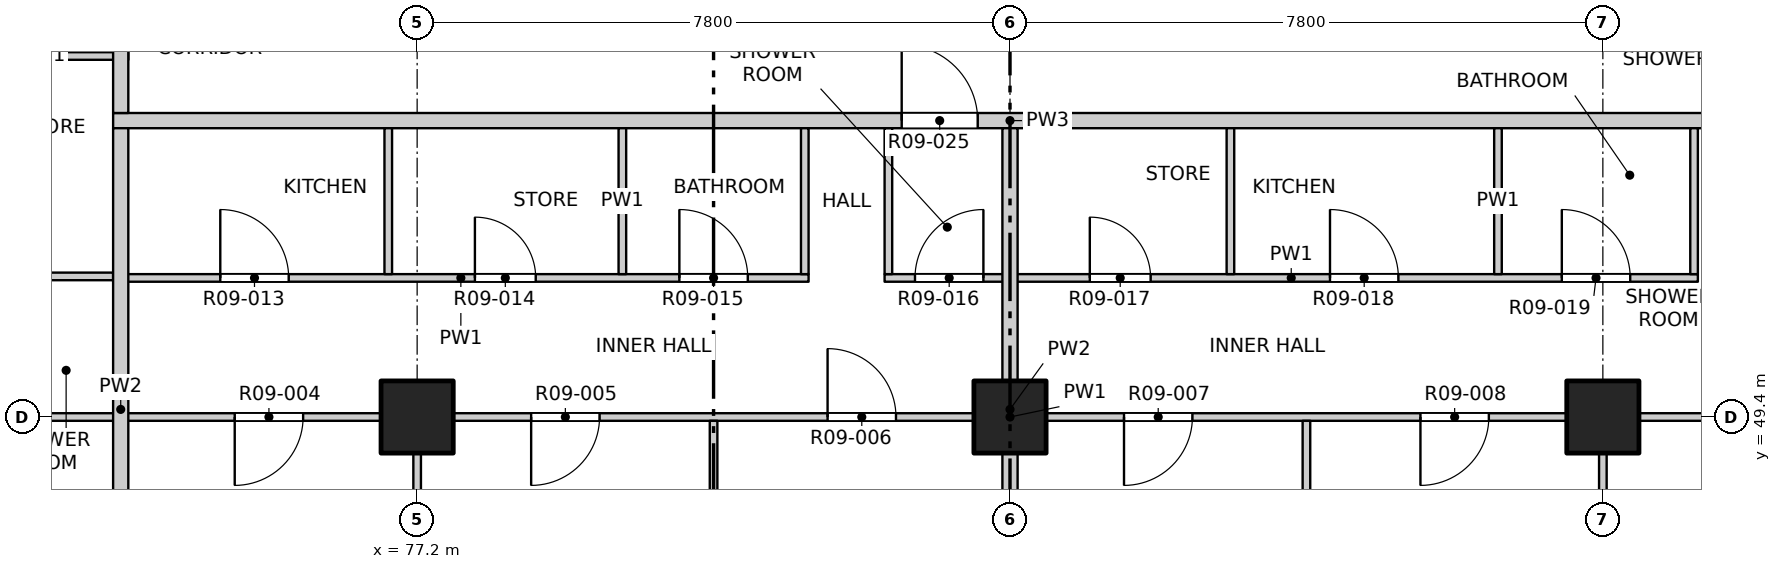
"""IFC4 building model, lengths in metres.
Left out: names, types, materials, properties, quantities, classifications, styles, units other than length and angle.
Written with IfcOpenShell. Run it as: python <this file> out.ifc"""

import sys

from ifc_helpers import new_model, si_unit, direction, frame, frame_2d, origin, origin_2d, place, context, subcontext, project, spatial, rectangle, extrude, element, fill, save


model = new_model("IFC4")
c1 = context("Model", 3, precision=1e-05, world=origin(), true_north=direction((0.0, 1.0)))
c2 = subcontext(c1, "Body", "Model", "MODEL_VIEW")
j1 = project(units=[si_unit("LENGTHUNIT", "METRE"), si_unit("PLANEANGLEUNIT", "RADIAN")], contexts=[c1])
p1 = place(None, origin())
s1 = spatial("IfcSite", under=j1, at=p1, CompositionType="ELEMENT")
p2 = place(p1, origin())
s2 = spatial("IfcBuilding", under=s1, at=p2, CompositionType="ELEMENT")
p3 = place(p2, frame((0.0, 0.0, 113.5)))
s3 = spatial("IfcBuildingStorey", under=s2, at=p3, CompositionType="ELEMENT", Elevation=113.5)
for number, where, z_axis, x_axis in (
    (1, (77.2, 49.4, -0.25), (0.0, 0.0, 1.0), (1.0, 0.0, 0.0)),
    (2, (85.0, 49.4, -0.25), (0.0, 0.0, 1.0), (1.0, 0.0, 0.0)),
    (3, (92.8, 49.4, -0.25), (0.0, 0.0, 1.0), (1.0, 0.0, 0.0)),
):
    element("IfcColumn", number, at=place(p3, frame(where, z_axis=z_axis, x_axis=x_axis)), inside=s3, PredefinedType="COLUMN", context=c2, shape_type="SweptSolid", body=[
        extrude(rectangle(XDim=0.95, YDim=0.95, at=origin_2d()), origin(), (0.0, 0.0, 1.0), 3.35),
    ])
p4 = place(p3, frame((65.8, 49.4, 0.0), z_axis=(0.0, 0.0, 1.0), x_axis=(1.0, 0.0, 0.0)))
e4 = element("IfcWall", 4, at=p4, inside=s3, PredefinedType="PARTITIONING", context=c2, shape_type="SweptSolid", body=[
    extrude(rectangle(XDim=38.4, YDim=0.1, at=frame_2d((19.2, 0.0))), origin(), (0.0, 0.0, 1.0), 3.1),
])
p5 = place(p4, frame((4.19, 0.0, 0.0)))
e5 = element("IfcOpeningElement", 5, at=p5, cuts=e4, PredefinedType="OPENING", context=c2, shape_type="SweptSolid", body=[
    extrude(rectangle(XDim=0.9, YDim=2.1, at=frame_2d((0.45, 1.05))), frame((0.0, 0.06, 0.0), z_axis=(0.0, -1.0, 0.0), x_axis=(1.0, 0.0, 0.0)), (0.0, 0.0, 1.0), 0.12),
])
p6 = place(p4, frame((9.0, 0.0, 0.0)))
e6 = element("IfcOpeningElement", 6, at=p6, cuts=e4, PredefinedType="OPENING", context=c2, shape_type="SweptSolid", body=[
    extrude(rectangle(XDim=0.9, YDim=2.1, at=frame_2d((0.45, 1.05))), frame((0.0, 0.06, 0.0), z_axis=(0.0, -1.0, 0.0), x_axis=(1.0, 0.0, 0.0)), (0.0, 0.0, 1.0), 0.12),
])
p7 = place(p4, frame((12.9, 0.0, 0.0)))
e7 = element("IfcOpeningElement", 7, at=p7, cuts=e4, PredefinedType="OPENING", context=c2, shape_type="SweptSolid", body=[
    extrude(rectangle(XDim=0.9, YDim=2.1, at=frame_2d((0.45, 1.05))), frame((0.0, 0.06, 0.0), z_axis=(0.0, -1.0, 0.0), x_axis=(1.0, 0.0, 0.0)), (0.0, 0.0, 1.0), 0.12),
])
p8 = place(p4, frame((16.8, 0.0, 0.0)))
e8 = element("IfcOpeningElement", 8, at=p8, cuts=e4, PredefinedType="OPENING", context=c2, shape_type="SweptSolid", body=[
    extrude(rectangle(XDim=0.9, YDim=2.1, at=frame_2d((0.45, 1.05))), frame((0.0, 0.06, 0.0), z_axis=(0.0, -1.0, 0.0), x_axis=(1.0, 0.0, 0.0)), (0.0, 0.0, 1.0), 0.12),
])
p9 = place(p4, frame((20.7, 0.0, 0.0)))
e9 = element("IfcOpeningElement", 9, at=p9, cuts=e4, PredefinedType="OPENING", context=c2, shape_type="SweptSolid", body=[
    extrude(rectangle(XDim=0.9, YDim=2.1, at=frame_2d((0.45, 1.05))), frame((0.0, 0.06, 0.0), z_axis=(0.0, -1.0, 0.0), x_axis=(1.0, 0.0, 0.0)), (0.0, 0.0, 1.0), 0.12),
])
p10 = place(p4, frame((24.6, 0.0, 0.0)))
e10 = element("IfcOpeningElement", 10, at=p10, cuts=e4, PredefinedType="OPENING", context=c2, shape_type="SweptSolid", body=[
    extrude(rectangle(XDim=0.9, YDim=2.1, at=frame_2d((0.45, 1.05))), frame((0.0, 0.06, 0.0), z_axis=(0.0, -1.0, 0.0), x_axis=(1.0, 0.0, 0.0)), (0.0, 0.0, 1.0), 0.12),
])
p11 = place(p4, frame((28.5, 0.0, 0.0)))
e11 = element("IfcOpeningElement", 11, at=p11, cuts=e4, PredefinedType="OPENING", context=c2, shape_type="SweptSolid", body=[
    extrude(rectangle(XDim=0.9, YDim=2.1, at=frame_2d((0.45, 1.05))), frame((0.0, 0.06, 0.0), z_axis=(0.0, -1.0, 0.0), x_axis=(1.0, 0.0, 0.0)), (0.0, 0.0, 1.0), 0.12),
])
p12 = place(p4, frame((33.31, 0.0, 0.0)))
e12 = element("IfcOpeningElement", 12, at=p12, cuts=e4, PredefinedType="OPENING", context=c2, shape_type="SweptSolid", body=[
    extrude(rectangle(XDim=0.9, YDim=2.1, at=frame_2d((0.45, 1.05))), frame((0.0, 0.06, 0.0), z_axis=(0.0, -1.0, 0.0), x_axis=(1.0, 0.0, 0.0)), (0.0, 0.0, 1.0), 0.12),
])
p13 = place(p3, frame((73.2, 51.23, 0.0), z_axis=(0.0, 0.0, 1.0), x_axis=(1.0, 0.0, 0.0)))
e13 = element("IfcWall", 13, at=p13, inside=s3, PredefinedType="PARTITIONING", context=c2, shape_type="SweptSolid", body=[
    extrude(rectangle(XDim=9.15, YDim=0.1, at=frame_2d((4.575, 0.0))), origin(), (0.0, 0.0, 1.0), 3.1),
])
p14 = place(p13, frame((1.41, 0.0, 0.0)))
e14 = element("IfcOpeningElement", 14, at=p14, cuts=e13, PredefinedType="OPENING", context=c2, shape_type="SweptSolid", body=[
    extrude(rectangle(XDim=0.9, YDim=2.1, at=frame_2d((0.45, 1.05))), frame((0.0, 0.06, 0.0), z_axis=(0.0, -1.0, 0.0), x_axis=(1.0, 0.0, 0.0)), (0.0, 0.0, 1.0), 0.12),
])
p15 = place(p13, frame((4.76, 0.0, 0.0)))
e15 = element("IfcOpeningElement", 15, at=p15, cuts=e13, PredefinedType="OPENING", context=c2, shape_type="SweptSolid", body=[
    extrude(rectangle(XDim=0.8, YDim=2.1, at=frame_2d((0.4, 1.05))), frame((0.0, 0.06, 0.0), z_axis=(0.0, -1.0, 0.0), x_axis=(1.0, 0.0, 0.0)), (0.0, 0.0, 1.0), 0.12),
])
p16 = place(p13, frame((7.45, 0.0, 0.0)))
e16 = element("IfcOpeningElement", 16, at=p16, cuts=e13, PredefinedType="OPENING", context=c2, shape_type="SweptSolid", body=[
    extrude(rectangle(XDim=0.9, YDim=2.1, at=frame_2d((0.45, 1.05))), frame((0.0, 0.06, 0.0), z_axis=(0.0, -1.0, 0.0), x_axis=(1.0, 0.0, 0.0)), (0.0, 0.0, 1.0), 0.12),
])
p17 = place(p3, frame((83.35, 51.23, 0.0), z_axis=(0.0, 0.0, 1.0), x_axis=(1.0, 0.0, 0.0)))
e17 = element("IfcWall", 17, at=p17, inside=s3, PredefinedType="PARTITIONING", context=c2, shape_type="SweptSolid", body=[
    extrude(rectangle(XDim=10.7, YDim=0.1, at=frame_2d((5.35, 0.0))), origin(), (0.0, 0.0, 1.0), 3.1),
])
p18 = place(p17, frame((0.4, 0.0, 0.0)))
e18 = element("IfcOpeningElement", 18, at=p18, cuts=e17, PredefinedType="OPENING", context=c2, shape_type="SweptSolid", body=[
    extrude(rectangle(XDim=0.9, YDim=2.1, at=frame_2d((0.45, 1.05))), frame((0.0, 0.06, 0.0), z_axis=(0.0, -1.0, 0.0), x_axis=(1.0, 0.0, 0.0)), (0.0, 0.0, 1.0), 0.12),
])
p19 = place(p17, frame((2.7, 0.0, 0.0)))
e19 = element("IfcOpeningElement", 19, at=p19, cuts=e17, PredefinedType="OPENING", context=c2, shape_type="SweptSolid", body=[
    extrude(rectangle(XDim=0.8, YDim=2.1, at=frame_2d((0.4, 1.05))), frame((0.0, 0.06, 0.0), z_axis=(0.0, -1.0, 0.0), x_axis=(1.0, 0.0, 0.0)), (0.0, 0.0, 1.0), 0.12),
])
p20 = place(p17, frame((5.86, 0.0, 0.0)))
e20 = element("IfcOpeningElement", 20, at=p20, cuts=e17, PredefinedType="OPENING", context=c2, shape_type="SweptSolid", body=[
    extrude(rectangle(XDim=0.9, YDim=2.1, at=frame_2d((0.45, 1.05))), frame((0.0, 0.06, 0.0), z_axis=(0.0, -1.0, 0.0), x_axis=(1.0, 0.0, 0.0)), (0.0, 0.0, 1.0), 0.12),
])
p21 = place(p17, frame((8.91, 0.0, 0.0)))
e21 = element("IfcOpeningElement", 21, at=p21, cuts=e17, PredefinedType="OPENING", context=c2, shape_type="SweptSolid", body=[
    extrude(rectangle(XDim=0.9, YDim=2.1, at=frame_2d((0.45, 1.05))), frame((0.0, 0.06, 0.0), z_axis=(0.0, -1.0, 0.0), x_axis=(1.0, 0.0, 0.0)), (0.0, 0.0, 1.0), 0.12),
])
p22 = place(p3, frame((71.18, 51.25, 0.0), z_axis=(0.0, 0.0, 1.0), x_axis=(1.0, 0.0, 0.0)))
e22 = element("IfcWall", 22, at=p22, inside=s3, PredefinedType="PARTITIONING", context=c2, shape_type="SweptSolid", body=[
    extrude(rectangle(XDim=2.02, YDim=0.1, at=frame_2d((1.01, 0.0))), origin(), (0.0, 0.0, 1.0), 3.1),
])
p23 = place(p3, frame((73.2, 53.3, 0.0), z_axis=(0.0, 0.0, 1.0), x_axis=(1.0, 0.0, 0.0)))
e23 = element("IfcWall", 23, at=p23, inside=s3, PredefinedType="PARTITIONING", context=c2, shape_type="SweptSolid", body=[
    extrude(rectangle(XDim=23.6, YDim=0.2, at=frame_2d((11.8, 0.0))), origin(), (0.0, 0.0, 1.0), 3.1),
])
p24 = place(p23, frame((10.375, 0.0, 0.0)))
e24 = element("IfcOpeningElement", 24, at=p24, cuts=e23, PredefinedType="OPENING", context=c2, shape_type="SweptSolid", body=[
    extrude(rectangle(XDim=1.0, YDim=2.1, at=frame_2d((0.5, 1.05))), frame((0.0, 0.11, 0.0), z_axis=(0.0, -1.0, 0.0), x_axis=(1.0, 0.0, 0.0)), (0.0, 0.0, 1.0), 0.22),
])
p25 = place(p23, frame((22.075, 0.0, 0.0)))
e25 = element("IfcOpeningElement", 25, at=p25, cuts=e23, PredefinedType="OPENING", context=c2, shape_type="SweptSolid", body=[
    extrude(rectangle(XDim=1.0, YDim=2.1, at=frame_2d((0.5, 1.05))), frame((0.0, 0.11, 0.0), z_axis=(0.0, -1.0, 0.0), x_axis=(1.0, 0.0, 0.0)), (0.0, 0.0, 1.0), 0.22),
])
p26 = place(p3, frame((71.18, 54.15, 0.0), z_axis=(0.0, 0.0, 1.0), x_axis=(1.0, 0.0, 0.0)))
e26 = element("IfcWall", 26, at=p26, inside=s3, PredefinedType="PARTITIONING", context=c2, shape_type="SweptSolid", body=[
    extrude(rectangle(XDim=2.22, YDim=0.1, at=frame_2d((1.11, 0.0))), origin(), (0.0, 0.0, 1.0), 3.1),
])
p27 = place(p3, frame((73.3, 45.8, 0.0), z_axis=(0.0, 0.0, 1.0), x_axis=(0.0, 1.0, 0.0)))
e27 = element("IfcWall", 27, at=p27, inside=s3, PredefinedType="PARTITIONING", context=c2, shape_type="SweptSolid", body=[
    extrude(rectangle(XDim=7.4, YDim=0.2, at=frame_2d((3.7, 0.0))), origin(), (0.0, 0.0, 1.0), 3.1),
])
p28 = place(p3, frame((73.3, 53.4, 0.0), z_axis=(0.0, 0.0, 1.0), x_axis=(0.0, 1.0, 0.0)))
e28 = element("IfcWall", 28, at=p28, inside=s3, PredefinedType="PARTITIONING", context=c2, shape_type="SweptSolid", body=[
    extrude(rectangle(XDim=30.8, YDim=0.2, at=frame_2d((15.4, 0.0))), origin(), (0.0, 0.0, 1.0), 3.1),
])
p29 = place(p28, frame((2.025, 0.0, 0.0)))
e29 = element("IfcOpeningElement", 29, at=p29, cuts=e28, PredefinedType="OPENING", context=c2, shape_type="SweptSolid", body=[
    extrude(rectangle(XDim=1.0, YDim=2.1, at=frame_2d((0.5, 1.05))), frame((0.0, 0.11, 0.0), z_axis=(0.0, -1.0, 0.0), x_axis=(1.0, 0.0, 0.0)), (0.0, 0.0, 1.0), 0.22),
])
p30 = place(p28, frame((14.875, 0.0, 0.0)))
e30 = element("IfcOpeningElement", 30, at=p30, cuts=e28, PredefinedType="OPENING", context=c2, shape_type="SweptSolid", body=[
    extrude(rectangle(XDim=1.0, YDim=2.1, at=frame_2d((0.5, 1.05))), frame((0.0, 0.11, 0.0), z_axis=(0.0, -1.0, 0.0), x_axis=(1.0, 0.0, 0.0)), (0.0, 0.0, 1.0), 0.22),
])
p31 = place(p28, frame((25.225, 0.0, 0.0)))
e31 = element("IfcOpeningElement", 31, at=p31, cuts=e28, PredefinedType="OPENING", context=c2, shape_type="SweptSolid", body=[
    extrude(rectangle(XDim=1.0, YDim=2.1, at=frame_2d((0.5, 1.05))), frame((0.0, 0.11, 0.0), z_axis=(0.0, -1.0, 0.0), x_axis=(1.0, 0.0, 0.0)), (0.0, 0.0, 1.0), 0.22),
])
p32 = place(p3, frame((76.82, 51.28, 0.0), z_axis=(0.0, 0.0, 1.0), x_axis=(0.0, 1.0, 0.0)))
e32 = element("IfcWall", 32, at=p32, inside=s3, PredefinedType="PARTITIONING", context=c2, shape_type="SweptSolid", body=[
    extrude(rectangle(XDim=1.92, YDim=0.1, at=frame_2d((0.96, 0.0))), origin(), (0.0, 0.0, 1.0), 3.1),
])
p33 = place(p3, frame((77.2, 45.8, 0.0), z_axis=(0.0, 0.0, 1.0), x_axis=(0.0, 1.0, 0.0)))
e33 = element("IfcWall", 33, at=p33, inside=s3, PredefinedType="PARTITIONING", context=c2, shape_type="SweptSolid", body=[
    extrude(rectangle(XDim=3.55, YDim=0.1, at=frame_2d((1.775, 0.0))), origin(), (0.0, 0.0, 1.0), 3.1),
])
p34 = place(p3, frame((79.9, 51.28, 0.0), z_axis=(0.0, 0.0, 1.0), x_axis=(0.0, 1.0, 0.0)))
e34 = element("IfcWall", 34, at=p34, inside=s3, PredefinedType="PARTITIONING", context=c2, shape_type="SweptSolid", body=[
    extrude(rectangle(XDim=1.92, YDim=0.1, at=frame_2d((0.96, 0.0))), origin(), (0.0, 0.0, 1.0), 3.1),
])
p35 = place(p3, frame((81.1, 45.8, 0.0), z_axis=(0.0, 0.0, 1.0), x_axis=(0.0, 1.0, 0.0)))
e35 = element("IfcWall", 35, at=p35, inside=s3, PredefinedType="PARTITIONING", context=c2, shape_type="SweptSolid", body=[
    extrude(rectangle(XDim=3.55, YDim=0.1, at=frame_2d((1.775, 0.0))), origin(), (0.0, 0.0, 1.0), 3.1),
])
for number, where, z_axis, x_axis in (
    (36, (82.3, 51.28, 0.0), (0.0, 0.0, 1.0), (0.0, 1.0, 0.0)),
    (37, (83.4, 51.28, 0.0), (0.0, 0.0, 1.0), (0.0, 1.0, 0.0)),
):
    element("IfcWall", number, at=place(p3, frame(where, z_axis=z_axis, x_axis=x_axis)), inside=s3, PredefinedType="PARTITIONING", context=c2, shape_type="SweptSolid", body=[
        extrude(rectangle(XDim=1.92, YDim=0.1, at=frame_2d((0.96, 0.0))), origin(), (0.0, 0.0, 1.0), 3.1),
    ])
p36 = place(p3, frame((85.0, 45.8, 0.0), z_axis=(0.0, 0.0, 1.0), x_axis=(0.0, 1.0, 0.0)))
e38 = element("IfcWall", 38, at=p36, inside=s3, PredefinedType="PARTITIONING", context=c2, shape_type="SweptSolid", body=[
    extrude(rectangle(XDim=7.4, YDim=0.2, at=frame_2d((3.7, 0.0))), origin(), (0.0, 0.0, 1.0), 3.1),
])
p37 = place(p3, frame((87.9, 51.28, 0.0), z_axis=(0.0, 0.0, 1.0), x_axis=(0.0, 1.0, 0.0)))
e39 = element("IfcWall", 39, at=p37, inside=s3, PredefinedType="PARTITIONING", context=c2, shape_type="SweptSolid", body=[
    extrude(rectangle(XDim=1.92, YDim=0.1, at=frame_2d((0.96, 0.0))), origin(), (0.0, 0.0, 1.0), 3.1),
])
p38 = place(p3, frame((88.9, 45.8, 0.0), z_axis=(0.0, 0.0, 1.0), x_axis=(0.0, 1.0, 0.0)))
e40 = element("IfcWall", 40, at=p38, inside=s3, PredefinedType="PARTITIONING", context=c2, shape_type="SweptSolid", body=[
    extrude(rectangle(XDim=3.55, YDim=0.1, at=frame_2d((1.775, 0.0))), origin(), (0.0, 0.0, 1.0), 3.1),
])
p39 = place(p3, frame((91.42, 51.28, 0.0), z_axis=(0.0, 0.0, 1.0), x_axis=(0.0, 1.0, 0.0)))
e41 = element("IfcWall", 41, at=p39, inside=s3, PredefinedType="PARTITIONING", context=c2, shape_type="SweptSolid", body=[
    extrude(rectangle(XDim=1.92, YDim=0.1, at=frame_2d((0.96, 0.0))), origin(), (0.0, 0.0, 1.0), 3.1),
])
p40 = place(p3, frame((92.8, 45.8, 0.0), z_axis=(0.0, 0.0, 1.0), x_axis=(0.0, 1.0, 0.0)))
e42 = element("IfcWall", 42, at=p40, inside=s3, PredefinedType="PARTITIONING", context=c2, shape_type="SweptSolid", body=[
    extrude(rectangle(XDim=3.55, YDim=0.1, at=frame_2d((1.775, 0.0))), origin(), (0.0, 0.0, 1.0), 3.1),
])
p41 = place(p3, frame((94.0, 51.28, 0.0), z_axis=(0.0, 0.0, 1.0), x_axis=(0.0, 1.0, 0.0)))
e43 = element("IfcWall", 43, at=p41, inside=s3, PredefinedType="PARTITIONING", context=c2, shape_type="SweptSolid", body=[
    extrude(rectangle(XDim=1.92, YDim=0.1, at=frame_2d((0.96, 0.0))), origin(), (0.0, 0.0, 1.0), 3.1),
])
p42 = place(p6, origin())
e44 = element("IfcDoor", 44, at=p42, inside=s3, OperationType="SINGLE_SWING_RIGHT", PredefinedType="DOOR", context=c2, shape_type="SweptSolid", body=[
    extrude(rectangle(XDim=0.9, YDim=2.1, at=frame_2d((0.45, 1.05))), frame((0.0, 0.025, 0.0), z_axis=(0.0, -1.0, 0.0), x_axis=(1.0, 0.0, 0.0)), (0.0, 0.0, 1.0), 0.05),
])
fill(e6, e44)
p43 = place(p7, origin())
e45 = element("IfcDoor", 45, at=p43, inside=s3, OperationType="SINGLE_SWING_RIGHT", PredefinedType="DOOR", context=c2, shape_type="SweptSolid", body=[
    extrude(rectangle(XDim=0.9, YDim=2.1, at=frame_2d((0.45, 1.05))), frame((0.0, 0.025, 0.0), z_axis=(0.0, -1.0, 0.0), x_axis=(1.0, 0.0, 0.0)), (0.0, 0.0, 1.0), 0.05),
])
fill(e7, e45)
p44 = place(p8, origin())
e46 = element("IfcDoor", 46, at=p44, inside=s3, OperationType="SINGLE_SWING_LEFT", PredefinedType="DOOR", context=c2, shape_type="SweptSolid", body=[
    extrude(rectangle(XDim=0.9, YDim=2.1, at=frame_2d((0.45, 1.05))), frame((0.0, 0.025, 0.0), z_axis=(0.0, -1.0, 0.0), x_axis=(1.0, 0.0, 0.0)), (0.0, 0.0, 1.0), 0.05),
])
fill(e8, e46)
p45 = place(p9, origin())
e47 = element("IfcDoor", 47, at=p45, inside=s3, OperationType="SINGLE_SWING_RIGHT", PredefinedType="DOOR", context=c2, shape_type="SweptSolid", body=[
    extrude(rectangle(XDim=0.9, YDim=2.1, at=frame_2d((0.45, 1.05))), frame((0.0, 0.025, 0.0), z_axis=(0.0, -1.0, 0.0), x_axis=(1.0, 0.0, 0.0)), (0.0, 0.0, 1.0), 0.05),
])
fill(e9, e47)
p46 = place(p10, origin())
e48 = element("IfcDoor", 48, at=p46, inside=s3, OperationType="SINGLE_SWING_RIGHT", PredefinedType="DOOR", context=c2, shape_type="SweptSolid", body=[
    extrude(rectangle(XDim=0.9, YDim=2.1, at=frame_2d((0.45, 1.05))), frame((0.0, 0.025, 0.0), z_axis=(0.0, -1.0, 0.0), x_axis=(1.0, 0.0, 0.0)), (0.0, 0.0, 1.0), 0.05),
])
fill(e10, e48)
p47 = place(p14, origin())
e49 = element("IfcDoor", 49, at=p47, inside=s3, OperationType="SINGLE_SWING_LEFT", PredefinedType="DOOR", context=c2, shape_type="SweptSolid", body=[
    extrude(rectangle(XDim=0.9, YDim=2.1, at=frame_2d((0.45, 1.05))), frame((0.0, 0.025, 0.0), z_axis=(0.0, -1.0, 0.0), x_axis=(1.0, 0.0, 0.0)), (0.0, 0.0, 1.0), 0.05),
])
fill(e14, e49)
p48 = place(p15, origin())
e50 = element("IfcDoor", 50, at=p48, inside=s3, OperationType="SINGLE_SWING_LEFT", PredefinedType="DOOR", context=c2, shape_type="SweptSolid", body=[
    extrude(rectangle(XDim=0.8, YDim=2.1, at=frame_2d((0.4, 1.05))), frame((0.0, 0.025, 0.0), z_axis=(0.0, -1.0, 0.0), x_axis=(1.0, 0.0, 0.0)), (0.0, 0.0, 1.0), 0.05),
])
fill(e15, e50)
p49 = place(p16, origin())
e51 = element("IfcDoor", 51, at=p49, inside=s3, OperationType="SINGLE_SWING_LEFT", PredefinedType="DOOR", context=c2, shape_type="SweptSolid", body=[
    extrude(rectangle(XDim=0.9, YDim=2.1, at=frame_2d((0.45, 1.05))), frame((0.0, 0.025, 0.0), z_axis=(0.0, -1.0, 0.0), x_axis=(1.0, 0.0, 0.0)), (0.0, 0.0, 1.0), 0.05),
])
fill(e16, e51)
p50 = place(p18, origin())
e52 = element("IfcDoor", 52, at=p50, inside=s3, OperationType="SINGLE_SWING_RIGHT", PredefinedType="DOOR", context=c2, shape_type="SweptSolid", body=[
    extrude(rectangle(XDim=0.9, YDim=2.1, at=frame_2d((0.45, 1.05))), frame((0.0, 0.025, 0.0), z_axis=(0.0, -1.0, 0.0), x_axis=(1.0, 0.0, 0.0)), (0.0, 0.0, 1.0), 0.05),
])
fill(e18, e52)
p51 = place(p19, origin())
e53 = element("IfcDoor", 53, at=p51, inside=s3, OperationType="SINGLE_SWING_LEFT", PredefinedType="DOOR", context=c2, shape_type="SweptSolid", body=[
    extrude(rectangle(XDim=0.8, YDim=2.1, at=frame_2d((0.4, 1.05))), frame((0.0, 0.025, 0.0), z_axis=(0.0, -1.0, 0.0), x_axis=(1.0, 0.0, 0.0)), (0.0, 0.0, 1.0), 0.05),
])
fill(e19, e53)
p52 = place(p20, origin())
e54 = element("IfcDoor", 54, at=p52, inside=s3, OperationType="SINGLE_SWING_LEFT", PredefinedType="DOOR", context=c2, shape_type="SweptSolid", body=[
    extrude(rectangle(XDim=0.9, YDim=2.1, at=frame_2d((0.45, 1.05))), frame((0.0, 0.025, 0.0), z_axis=(0.0, -1.0, 0.0), x_axis=(1.0, 0.0, 0.0)), (0.0, 0.0, 1.0), 0.05),
])
fill(e20, e54)
p53 = place(p21, origin())
e55 = element("IfcDoor", 55, at=p53, inside=s3, OperationType="SINGLE_SWING_LEFT", PredefinedType="DOOR", context=c2, shape_type="SweptSolid", body=[
    extrude(rectangle(XDim=0.9, YDim=2.1, at=frame_2d((0.45, 1.05))), frame((0.0, 0.025, 0.0), z_axis=(0.0, -1.0, 0.0), x_axis=(1.0, 0.0, 0.0)), (0.0, 0.0, 1.0), 0.05),
])
fill(e21, e55)
p54 = place(p24, origin())
e56 = element("IfcDoor", 56, at=p54, inside=s3, OperationType="SINGLE_SWING_LEFT", PredefinedType="DOOR", context=c2, shape_type="SweptSolid", body=[
    extrude(rectangle(XDim=1.0, YDim=2.1, at=frame_2d((0.5, 1.05))), frame((0.0, 0.025, 0.0), z_axis=(0.0, -1.0, 0.0), x_axis=(1.0, 0.0, 0.0)), (0.0, 0.0, 1.0), 0.05),
])
fill(e24, e56)
save(model, sys.argv[1])
